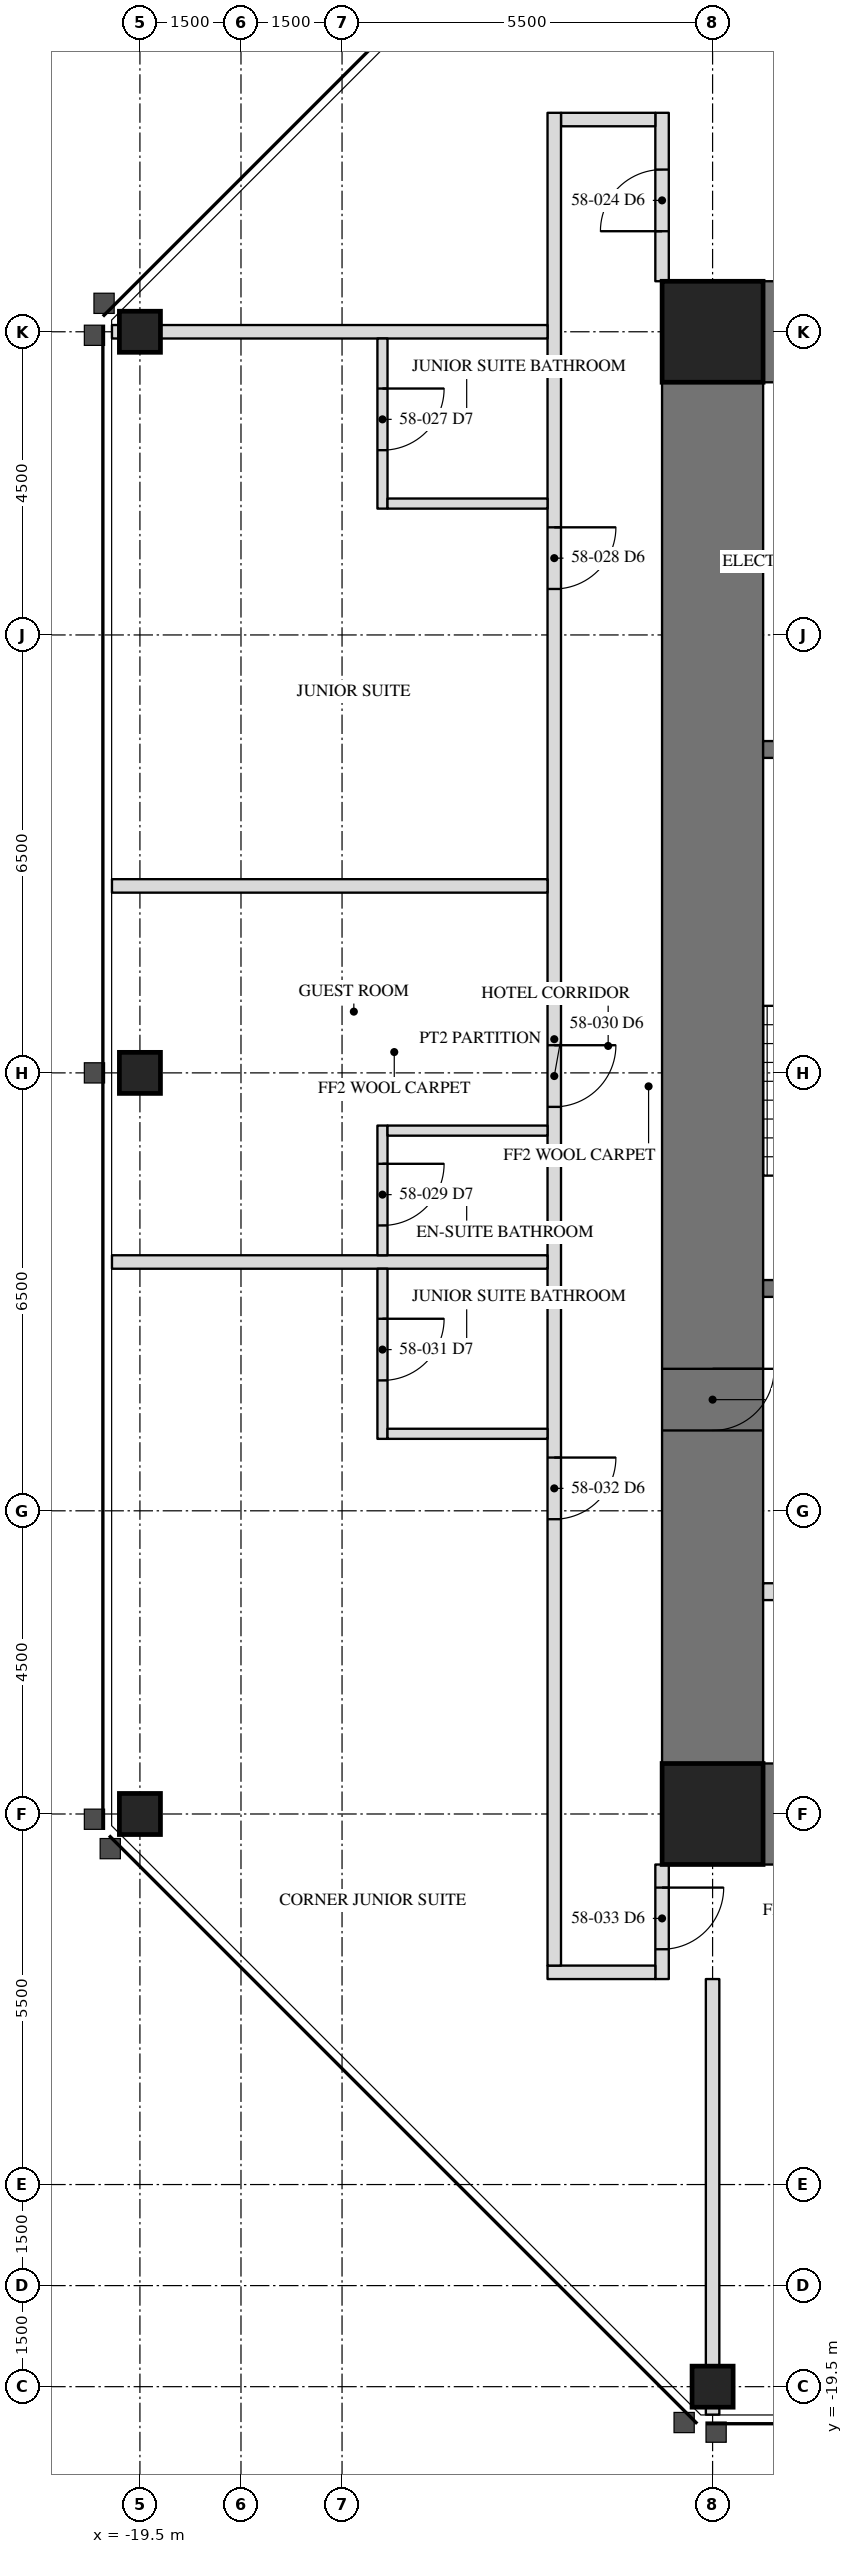
"""IFC4 building model, lengths in metres.
Left out: names, types, materials, properties, quantities, classifications, styles, units other than length and angle.
Written with IfcOpenShell. Run it as: python <this file> out.ifc"""

import sys

from ifc_helpers import new_model, si_unit, direction, frame, frame_2d, origin, origin_2d, place, context, subcontext, project, spatial, rectangle, hollow_rectangle, extrude, element, fill, save


model = new_model("IFC4")
c1 = context("Model", 3, precision=1e-05, world=origin(), true_north=direction((0.0, 1.0)))
c2 = subcontext(c1, "Body", "Model", "MODEL_VIEW")
j1 = project(units=[si_unit("LENGTHUNIT", "METRE"), si_unit("PLANEANGLEUNIT", "RADIAN")], contexts=[c1])
p1 = place(None, origin())
s1 = spatial("IfcSite", under=j1, at=p1, CompositionType="ELEMENT")
p2 = place(p1, origin())
s2 = spatial("IfcBuilding", under=s1, at=p2, CompositionType="ELEMENT")
p3 = place(p2, frame((0.0, 0.0, 239.7)))
s3 = spatial("IfcBuildingStorey", under=s2, at=p3, CompositionType="ELEMENT", Elevation=239.7)
for number, where, z_axis, x_axis in (
    (1, (-19.5, 0.0, 0.0), (0.0, 0.0, 1.0), (0.0, 1.0, 0.0)),
    (2, (-19.5, -11.0, 0.0), (0.0, 0.0, 1.0), (0.0, 1.0, 0.0)),
    (3, (-11.0, -19.5, 0.0), (0.0, 0.0, 1.0), (1.0, 0.0, 0.0)),
    (4, (-19.5, 11.0, 0.0), (0.0, 0.0, 1.0), (0.0, 1.0, 0.0)),
):
    element("IfcColumn", number, at=place(p3, frame(where, z_axis=z_axis, x_axis=x_axis)), inside=s3, PredefinedType="COLUMN", context=c2, shape_type="SweptSolid", body=[
        extrude(hollow_rectangle(XDim=0.61, YDim=0.61, WallThickness=0.051, at=origin_2d()), origin(), (0.0, 0.0, 1.0), 3.5),
    ])
p4 = place(p3, frame((-11.0, 11.0, 0.0), z_axis=(0.0, 0.0, 1.0), x_axis=(0.0, -1.0, 0.0)))
e5 = element("IfcWall", 5, at=p4, inside=s3, PredefinedType="SHEAR", context=c2, shape_type="SweptSolid", body=[
    extrude(rectangle(XDim=22.0, YDim=1.5, at=frame_2d((11.0, 0.0))), origin(), (0.0, 0.0, 1.0), 3.5),
])
p5 = place(p4, frame((15.393, 0.0, 0.0)))
e6 = element("IfcOpeningElement", 6, at=p5, cuts=e5, PredefinedType="OPENING", context=c2, shape_type="SweptSolid", body=[
    extrude(rectangle(XDim=0.915, YDim=2.134, at=frame_2d((0.458, 1.067))), frame((0.0, 0.76, 0.0), z_axis=(0.0, -1.0, 0.0), x_axis=(1.0, 0.0, 0.0)), (0.0, 0.0, 1.0), 1.52),
])
for number, where, z_axis, x_axis in (
    (7, (-6.5, 11.0, 0.0), (0.0, 0.0, 1.0), (-1.0, 0.0, 0.0)),
    (8, (-11.0, -11.0, 0.0), (0.0, 0.0, 1.0), (1.0, 0.0, 0.0)),
):
    element("IfcWall", number, at=place(p3, frame(where, z_axis=z_axis, x_axis=x_axis)), inside=s3, PredefinedType="SHEAR", context=c2, shape_type="SweptSolid", body=[
        extrude(rectangle(XDim=4.5, YDim=1.5, at=frame_2d((2.25, 0.0))), origin(), (0.0, 0.0, 1.0), 3.5),
    ])
for number, where, z_axis, x_axis in (
    (9, (-11.0, 11.0, 0.0), (0.0, 0.0, 1.0), (1.0, 0.0, 0.0)),
    (10, (-11.0, -11.0, 0.0), (0.0, 0.0, 1.0), (1.0, 0.0, 0.0)),
):
    element("IfcColumn", number, at=place(p3, frame(where, z_axis=z_axis, x_axis=x_axis)), inside=s3, PredefinedType="COLUMN", context=c2, shape_type="SweptSolid", body=[
        extrude(hollow_rectangle(XDim=1.499, YDim=1.499, WallThickness=0.102, at=origin_2d()), origin(), (0.0, 0.0, 1.0), 3.5),
    ])
p6 = place(p3, frame((-6.95, 4.8, 0.0), z_axis=(0.0, 0.0, 1.0), x_axis=(-1.0, 0.0, 0.0)))
e11 = element("IfcWall", 11, at=p6, inside=s3, PredefinedType="SOLIDWALL", context=c2, shape_type="SweptSolid", body=[
    extrude(rectangle(XDim=3.3, YDim=0.25, at=frame_2d((1.65, 0.0))), origin(), (0.0, 0.0, 1.0), 3.31),
])
p7 = place(p3, frame((-6.95, -3.2, 0.0), z_axis=(0.0, 0.0, 1.0), x_axis=(-1.0, 0.0, 0.0)))
e12 = element("IfcWall", 12, at=p7, inside=s3, PredefinedType="SOLIDWALL", context=c2, shape_type="SweptSolid", body=[
    extrude(rectangle(XDim=3.3, YDim=0.25, at=frame_2d((1.65, 0.0))), origin(), (0.0, 0.0, 1.0), 3.31),
])
p8 = place(p7, frame((1.116, 0.0, 0.0)))
e13 = element("IfcOpeningElement", 13, at=p8, cuts=e12, PredefinedType="OPENING", context=c2, shape_type="SweptSolid", body=[
    extrude(rectangle(XDim=1.067, YDim=2.134, at=frame_2d((0.533, 1.067))), frame((0.0, 0.135, 0.0), z_axis=(0.0, -1.0, 0.0), x_axis=(1.0, 0.0, 0.0)), (0.0, 0.0, 1.0), 0.27),
])
p9 = place(p3, frame((-6.95, -7.7, 0.0), z_axis=(0.0, 0.0, 1.0), x_axis=(-1.0, 0.0, 0.0)))
e14 = element("IfcWall", 14, at=p9, inside=s3, PredefinedType="PARTITIONING", context=c2, shape_type="SweptSolid", body=[
    extrude(rectangle(XDim=3.3, YDim=0.25, at=frame_2d((1.65, 0.0))), origin(), (0.0, 0.0, 1.0), 3.31),
])
p10 = place(p9, frame((0.45, 0.0, 0.0)))
e15 = element("IfcOpeningElement", 15, at=p10, cuts=e14, PredefinedType="OPENING", context=c2, shape_type="SweptSolid", body=[
    extrude(rectangle(XDim=1.219, YDim=2.134, at=frame_2d((0.609, 1.067))), frame((0.0, 0.135, 0.0), z_axis=(0.0, -1.0, 0.0), x_axis=(1.0, 0.0, 0.0)), (0.0, 0.0, 1.0), 0.27),
])
p11 = place(p3, frame((-11.75, 11.75, 0.0), z_axis=(0.0, 0.0, 1.0), x_axis=(0.0, 1.0, 0.0)))
e16 = element("IfcWall", 16, at=p11, inside=s3, PredefinedType="PARTITIONING", context=c2, shape_type="SweptSolid", body=[
    extrude(rectangle(XDim=2.5, YDim=0.2, at=frame_2d((1.25, 0.0))), origin(), (0.0, 0.0, 1.0), 3.31),
])
p12 = place(p11, frame((0.742, 0.0, 0.0)))
e17 = element("IfcOpeningElement", 17, at=p12, cuts=e16, PredefinedType="OPENING", context=c2, shape_type="SweptSolid", body=[
    extrude(rectangle(XDim=0.915, YDim=2.134, at=frame_2d((0.458, 1.067))), frame((0.0, 0.11, 0.0), z_axis=(0.0, -1.0, 0.0), x_axis=(1.0, 0.0, 0.0)), (0.0, 0.0, 1.0), 0.22),
])
p13 = place(p3, frame((-11.85, 14.15, 0.0), z_axis=(0.0, 0.0, 1.0), x_axis=(-1.0, 0.0, 0.0)))
e18 = element("IfcWall", 18, at=p13, inside=s3, PredefinedType="PARTITIONING", context=c2, shape_type="SweptSolid", body=[
    extrude(rectangle(XDim=1.4, YDim=0.2, at=frame_2d((0.7, 0.0))), origin(), (0.0, 0.0, 1.0), 3.31),
])
p14 = place(p3, frame((-11.75, -11.75, 0.0), z_axis=(0.0, 0.0, 1.0), x_axis=(0.0, -1.0, 0.0)))
e19 = element("IfcWall", 19, at=p14, inside=s3, PredefinedType="PARTITIONING", context=c2, shape_type="SweptSolid", body=[
    extrude(rectangle(XDim=1.7, YDim=0.2, at=frame_2d((0.85, 0.0))), origin(), (0.0, 0.0, 1.0), 3.31),
])
p15 = place(p14, frame((0.343, 0.0, 0.0)))
e20 = element("IfcOpeningElement", 20, at=p15, cuts=e19, PredefinedType="OPENING", context=c2, shape_type="SweptSolid", body=[
    extrude(rectangle(XDim=0.915, YDim=2.134, at=frame_2d((0.458, 1.067))), frame((0.0, 0.11, 0.0), z_axis=(0.0, -1.0, 0.0), x_axis=(1.0, 0.0, 0.0)), (0.0, 0.0, 1.0), 0.22),
])
p16 = place(p3, frame((-13.45, -13.35, 0.0), z_axis=(0.0, 0.0, 1.0), x_axis=(1.0, 0.0, 0.0)))
e21 = element("IfcWall", 21, at=p16, inside=s3, PredefinedType="PARTITIONING", context=c2, shape_type="SweptSolid", body=[
    extrude(rectangle(XDim=1.6, YDim=0.2, at=frame_2d((0.8, 0.0))), origin(), (0.0, 0.0, 1.0), 3.31),
])
p17 = place(p3, frame((-13.35, 14.25, 0.0), z_axis=(0.0, 0.0, 1.0), x_axis=(0.0, -1.0, 0.0)))
e22 = element("IfcWall", 22, at=p17, inside=s3, PredefinedType="PARTITIONING", context=c2, shape_type="SweptSolid", body=[
    extrude(rectangle(XDim=27.5, YDim=0.2, at=frame_2d((13.75, 0.0))), origin(), (0.0, 0.0, 1.0), 3.31),
])
p18 = place(p17, frame((6.153, 0.0, 0.0)))
e23 = element("IfcOpeningElement", 23, at=p18, cuts=e22, PredefinedType="OPENING", context=c2, shape_type="SweptSolid", body=[
    extrude(rectangle(XDim=0.915, YDim=2.134, at=frame_2d((0.458, 1.067))), frame((0.0, 0.11, 0.0), z_axis=(0.0, -1.0, 0.0), x_axis=(1.0, 0.0, 0.0)), (0.0, 0.0, 1.0), 0.22),
])
p19 = place(p17, frame((13.84, 0.0, 0.0)))
e24 = element("IfcOpeningElement", 24, at=p19, cuts=e22, PredefinedType="OPENING", context=c2, shape_type="SweptSolid", body=[
    extrude(rectangle(XDim=0.915, YDim=2.134, at=frame_2d((0.458, 1.067))), frame((0.0, 0.11, 0.0), z_axis=(0.0, -1.0, 0.0), x_axis=(1.0, 0.0, 0.0)), (0.0, 0.0, 1.0), 0.22),
])
p20 = place(p17, frame((19.959, 0.0, 0.0)))
e25 = element("IfcOpeningElement", 25, at=p20, cuts=e22, PredefinedType="OPENING", context=c2, shape_type="SweptSolid", body=[
    extrude(rectangle(XDim=0.915, YDim=2.134, at=frame_2d((0.458, 1.067))), frame((0.0, 0.11, 0.0), z_axis=(0.0, -1.0, 0.0), x_axis=(1.0, 0.0, 0.0)), (0.0, 0.0, 1.0), 0.22),
])
p21 = place(p3, frame((-13.45, 11.0, 0.0), z_axis=(0.0, 0.0, 1.0), x_axis=(-1.0, 0.0, 0.0)))
e26 = element("IfcWall", 26, at=p21, inside=s3, PredefinedType="PARTITIONING", context=c2, shape_type="SweptSolid", body=[
    extrude(rectangle(XDim=6.465, YDim=0.2, at=frame_2d((3.232, 0.0))), origin(), (0.0, 0.0, 1.0), 2.802),
])
for number, where, z_axis, x_axis in (
    (27, (-13.45, 2.775, 0.0), (0.0, 0.0, 1.0), (-1.0, 0.0, 0.0)),
    (28, (-13.45, -2.807, 0.0), (0.0, 0.0, 1.0), (-1.0, 0.0, 0.0)),
):
    element("IfcWall", number, at=place(p3, frame(where, z_axis=z_axis, x_axis=x_axis)), inside=s3, PredefinedType="PARTITIONING", context=c2, shape_type="SweptSolid", body=[
        extrude(rectangle(XDim=6.465, YDim=0.2, at=frame_2d((3.232, 0.0))), origin(), (0.0, 0.0, 1.0), 3.31),
    ])
p22 = place(p3, frame((-15.9, 10.9, 0.0), z_axis=(0.0, 0.0, 1.0), x_axis=(0.0, -1.0, 0.0)))
e29 = element("IfcWall", 29, at=p22, inside=s3, PredefinedType="PARTITIONING", context=c2, shape_type="SweptSolid", body=[
    extrude(rectangle(XDim=2.525, YDim=0.15, at=frame_2d((1.262, 0.0))), origin(), (0.0, 0.0, 1.0), 3.31),
])
p23 = place(p22, frame((0.742, 0.0, 0.0)))
e30 = element("IfcOpeningElement", 30, at=p23, cuts=e29, PredefinedType="OPENING", context=c2, shape_type="SweptSolid", body=[
    extrude(rectangle(XDim=0.915, YDim=2.032, at=frame_2d((0.458, 1.016))), frame((0.0, 0.085, 0.0), z_axis=(0.0, -1.0, 0.0), x_axis=(1.0, 0.0, 0.0)), (0.0, 0.0, 1.0), 0.17),
])
p24 = place(p3, frame((-13.45, 8.45, 0.0), z_axis=(0.0, 0.0, 1.0), x_axis=(-1.0, 0.0, 0.0)))
e31 = element("IfcWall", 31, at=p24, inside=s3, PredefinedType="PARTITIONING", context=c2, shape_type="SweptSolid", body=[
    extrude(rectangle(XDim=2.375, YDim=0.15, at=frame_2d((1.188, 0.0))), origin(), (0.0, 0.0, 1.0), 3.31),
])
p25 = place(p3, frame((-15.9, -0.782, 0.0), z_axis=(0.0, 0.0, 1.0), x_axis=(0.0, -1.0, 0.0)))
e32 = element("IfcWall", 32, at=p25, inside=s3, PredefinedType="PARTITIONING", context=c2, shape_type="SweptSolid", body=[
    extrude(rectangle(XDim=1.925, YDim=0.15, at=frame_2d((0.962, 0.0))), origin(), (0.0, 0.0, 1.0), 3.31),
])
p26 = place(p25, frame((0.567, 0.0, 0.0)))
e33 = element("IfcOpeningElement", 33, at=p26, cuts=e32, PredefinedType="OPENING", context=c2, shape_type="SweptSolid", body=[
    extrude(rectangle(XDim=0.915, YDim=2.032, at=frame_2d((0.458, 1.016))), frame((0.0, 0.085, 0.0), z_axis=(0.0, -1.0, 0.0), x_axis=(1.0, 0.0, 0.0)), (0.0, 0.0, 1.0), 0.17),
])
p27 = place(p3, frame((-13.45, -0.857, 0.0), z_axis=(0.0, 0.0, 1.0), x_axis=(-1.0, 0.0, 0.0)))
e34 = element("IfcWall", 34, at=p27, inside=s3, PredefinedType="PARTITIONING", context=c2, shape_type="SweptSolid", body=[
    extrude(rectangle(XDim=2.375, YDim=0.15, at=frame_2d((1.188, 0.0))), origin(), (0.0, 0.0, 1.0), 3.31),
])
p28 = place(p3, frame((-15.9, -2.907, 0.0), z_axis=(0.0, 0.0, 1.0), x_axis=(0.0, -1.0, 0.0)))
e35 = element("IfcWall", 35, at=p28, inside=s3, PredefinedType="PARTITIONING", context=c2, shape_type="SweptSolid", body=[
    extrude(rectangle(XDim=2.525, YDim=0.15, at=frame_2d((1.262, 0.0))), origin(), (0.0, 0.0, 1.0), 3.31),
])
p29 = place(p28, frame((0.742, 0.0, 0.0)))
e36 = element("IfcOpeningElement", 36, at=p29, cuts=e35, PredefinedType="OPENING", context=c2, shape_type="SweptSolid", body=[
    extrude(rectangle(XDim=0.915, YDim=2.032, at=frame_2d((0.458, 1.016))), frame((0.0, 0.085, 0.0), z_axis=(0.0, -1.0, 0.0), x_axis=(1.0, 0.0, 0.0)), (0.0, 0.0, 1.0), 0.17),
])
p30 = place(p3, frame((-13.45, -5.357, 0.0), z_axis=(0.0, 0.0, 1.0), x_axis=(-1.0, 0.0, 0.0)))
e37 = element("IfcWall", 37, at=p30, inside=s3, PredefinedType="PARTITIONING", context=c2, shape_type="SweptSolid", body=[
    extrude(rectangle(XDim=2.375, YDim=0.15, at=frame_2d((1.188, 0.0))), origin(), (0.0, 0.0, 1.0), 3.31),
])
p31 = place(p3, frame((-11.0, -13.45, 0.0), z_axis=(0.0, 0.0, 1.0), x_axis=(0.0, -1.0, 0.0)))
e38 = element("IfcWall", 38, at=p31, inside=s3, PredefinedType="PARTITIONING", context=c2, shape_type="SweptSolid", body=[
    extrude(rectangle(XDim=6.465, YDim=0.2, at=frame_2d((3.232, 0.0))), origin(), (0.0, 0.0, 1.0), 2.802),
])
p32 = place(p5, origin())
e39 = element("IfcDoor", 39, at=p32, inside=s3, OperationType="SINGLE_SWING_RIGHT", PredefinedType="DOOR", context=c2, shape_type="SweptSolid", body=[
    extrude(rectangle(XDim=0.915, YDim=2.134, at=frame_2d((0.458, 1.067))), frame((0.0, -0.675, 0.0), z_axis=(0.0, -1.0, 0.0), x_axis=(1.0, 0.0, 0.0)), (0.0, 0.0, 1.0), 0.05),
])
fill(e6, e39)
p33 = place(p12, origin())
e40 = element("IfcDoor", 40, at=p33, inside=s3, OperationType="SINGLE_SWING_LEFT", PredefinedType="DOOR", context=c2, shape_type="SweptSolid", body=[
    extrude(rectangle(XDim=0.915, YDim=2.134, at=frame_2d((0.458, 1.067))), frame((0.0, 0.025, 0.0), z_axis=(0.0, -1.0, 0.0), x_axis=(1.0, 0.0, 0.0)), (0.0, 0.0, 1.0), 0.05),
])
fill(e17, e40)
p34 = place(p23, origin())
e41 = element("IfcDoor", 41, at=p34, inside=s3, OperationType="SINGLE_SWING_LEFT", PredefinedType="DOOR", context=c2, shape_type="SweptSolid", body=[
    extrude(rectangle(XDim=0.915, YDim=2.032, at=frame_2d((0.458, 1.016))), frame((0.0, 0.025, 0.0), z_axis=(0.0, -1.0, 0.0), x_axis=(1.0, 0.0, 0.0)), (0.0, 0.0, 1.0), 0.05),
])
fill(e30, e41)
p35 = place(p18, origin())
e42 = element("IfcDoor", 42, at=p35, inside=s3, OperationType="SINGLE_SWING_LEFT", PredefinedType="DOOR", context=c2, shape_type="SweptSolid", body=[
    extrude(rectangle(XDim=0.915, YDim=2.134, at=frame_2d((0.458, 1.067))), frame((0.0, 0.025, 0.0), z_axis=(0.0, -1.0, 0.0), x_axis=(1.0, 0.0, 0.0)), (0.0, 0.0, 1.0), 0.05),
])
fill(e23, e42)
p36 = place(p26, origin())
e43 = element("IfcDoor", 43, at=p36, inside=s3, OperationType="SINGLE_SWING_LEFT", PredefinedType="DOOR", context=c2, shape_type="SweptSolid", body=[
    extrude(rectangle(XDim=0.915, YDim=2.032, at=frame_2d((0.458, 1.016))), frame((0.0, 0.025, 0.0), z_axis=(0.0, -1.0, 0.0), x_axis=(1.0, 0.0, 0.0)), (0.0, 0.0, 1.0), 0.05),
])
fill(e33, e43)
p37 = place(p19, origin())
e44 = element("IfcDoor", 44, at=p37, inside=s3, OperationType="SINGLE_SWING_LEFT", PredefinedType="DOOR", context=c2, shape_type="SweptSolid", body=[
    extrude(rectangle(XDim=0.915, YDim=2.134, at=frame_2d((0.458, 1.067))), frame((0.0, 0.025, 0.0), z_axis=(0.0, -1.0, 0.0), x_axis=(1.0, 0.0, 0.0)), (0.0, 0.0, 1.0), 0.05),
])
fill(e24, e44)
p38 = place(p29, origin())
e45 = element("IfcDoor", 45, at=p38, inside=s3, OperationType="SINGLE_SWING_LEFT", PredefinedType="DOOR", context=c2, shape_type="SweptSolid", body=[
    extrude(rectangle(XDim=0.915, YDim=2.032, at=frame_2d((0.458, 1.016))), frame((0.0, 0.025, 0.0), z_axis=(0.0, -1.0, 0.0), x_axis=(1.0, 0.0, 0.0)), (0.0, 0.0, 1.0), 0.05),
])
fill(e36, e45)
p39 = place(p20, origin())
e46 = element("IfcDoor", 46, at=p39, inside=s3, OperationType="SINGLE_SWING_LEFT", PredefinedType="DOOR", context=c2, shape_type="SweptSolid", body=[
    extrude(rectangle(XDim=0.915, YDim=2.134, at=frame_2d((0.458, 1.067))), frame((0.0, 0.025, 0.0), z_axis=(0.0, -1.0, 0.0), x_axis=(1.0, 0.0, 0.0)), (0.0, 0.0, 1.0), 0.05),
])
fill(e25, e46)
p40 = place(p15, origin())
e47 = element("IfcDoor", 47, at=p40, inside=s3, OperationType="SINGLE_SWING_LEFT", PredefinedType="DOOR", context=c2, shape_type="SweptSolid", body=[
    extrude(rectangle(XDim=0.915, YDim=2.134, at=frame_2d((0.458, 1.067))), frame((0.0, 0.025, 0.0), z_axis=(0.0, -1.0, 0.0), x_axis=(1.0, 0.0, 0.0)), (0.0, 0.0, 1.0), 0.05),
])
fill(e20, e47)
save(model, sys.argv[1])
